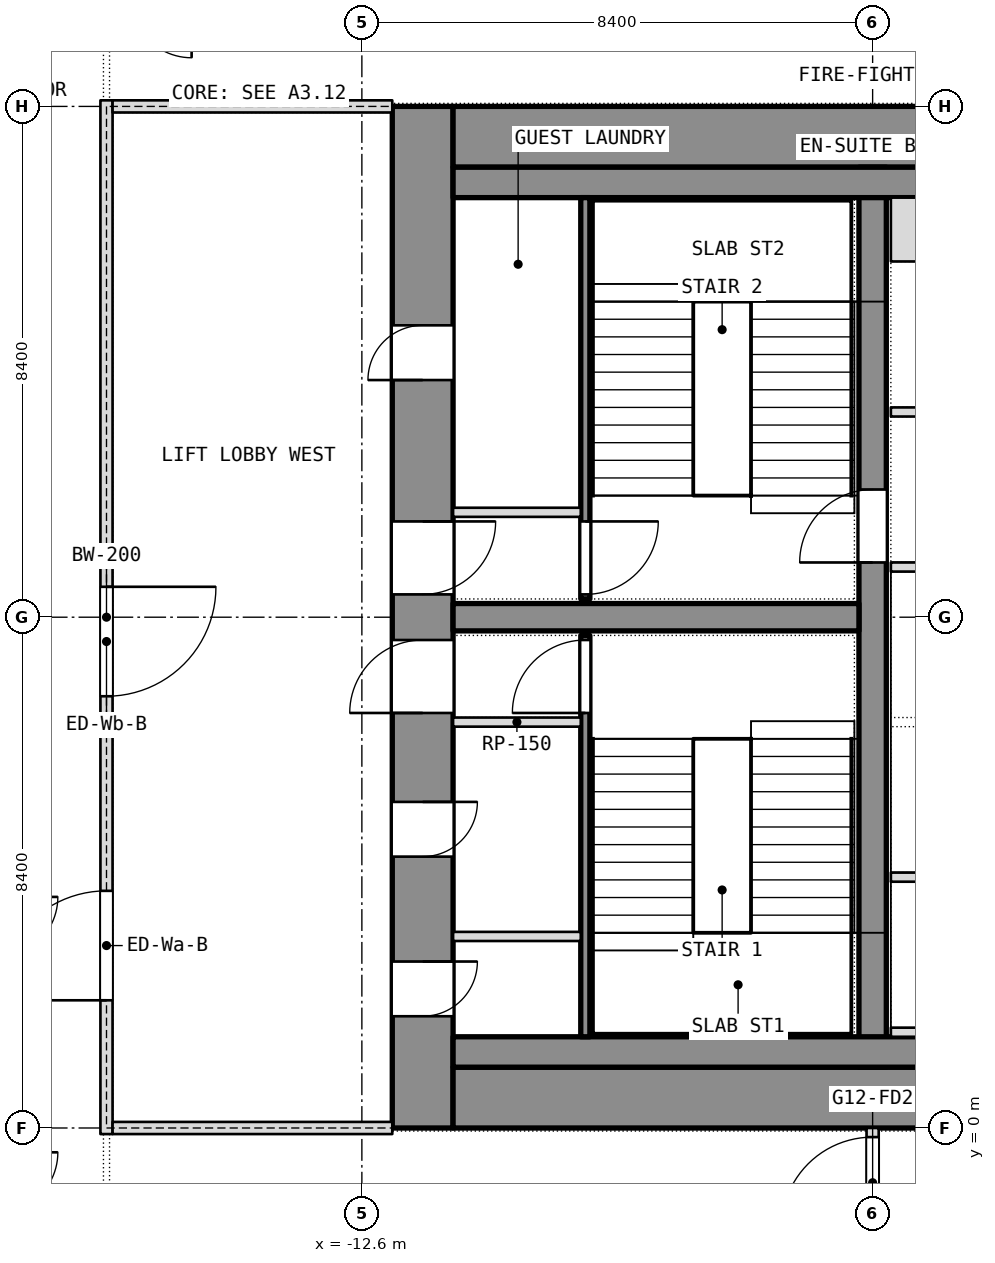
"""IFC4 building model, lengths in metres.
Left out: names, types, materials, properties, quantities, classifications, styles, units other than length and angle.
Written with IfcOpenShell. Run it as: python <this file> out.ifc"""

import sys

from ifc_helpers import new_model, si_unit, direction, frame, frame_2d, origin, place, context, subcontext, project, spatial, rectangle, extrude, element, fill, save


model = new_model("IFC4")
c1 = context("Model", 3, precision=1e-05, world=origin(), true_north=direction((0.0, 1.0)))
c2 = subcontext(c1, "Body", "Model", "MODEL_VIEW")
j1 = project(units=[si_unit("LENGTHUNIT", "METRE"), si_unit("PLANEANGLEUNIT", "RADIAN")], contexts=[c1])
p1 = place(None, origin())
s1 = spatial("IfcSite", under=j1, at=p1, CompositionType="ELEMENT")
p2 = place(p1, origin())
s2 = spatial("IfcBuilding", under=s1, at=p2, CompositionType="ELEMENT")
p3 = place(p2, frame((0.0, 0.0, 140.9)))
s3 = spatial("IfcBuildingStorey", under=s2, at=p3, CompositionType="ELEMENT", Elevation=140.9)
p4 = place(p3, frame((-11.6, 0.0, 0.0), z_axis=(0.0, 0.0, 1.0), x_axis=(0.0, 1.0, 0.0)))
e1 = element("IfcWall", 1, at=p4, inside=s3, PredefinedType="SHEAR", context=c2, shape_type="SweptSolid", body=[
    extrude(rectangle(XDim=16.8, YDim=1.0, at=frame_2d((8.4, 0.0))), origin(), (0.0, 0.0, 1.0), 3.6),
])
p5 = place(p4, frame((1.837, 0.0, 0.0)))
e2 = element("IfcOpeningElement", 2, at=p5, cuts=e1, PredefinedType="OPENING", context=c2, shape_type="SweptSolid", body=[
    extrude(rectangle(XDim=0.9, YDim=2.1, at=frame_2d((0.45, 1.05))), frame((0.0, 0.5, 0.0), z_axis=(0.0, -1.0, 0.0), x_axis=(1.0, 0.0, 0.0)), (0.0, 0.0, 1.0), 1.0),
])
p6 = place(p4, frame((4.462, 0.0, 0.0)))
e3 = element("IfcOpeningElement", 3, at=p6, cuts=e1, PredefinedType="OPENING", context=c2, shape_type="SweptSolid", body=[
    extrude(rectangle(XDim=0.9, YDim=2.1, at=frame_2d((0.45, 1.05))), frame((0.0, 0.5, 0.0), z_axis=(0.0, -1.0, 0.0), x_axis=(1.0, 0.0, 0.0)), (0.0, 0.0, 1.0), 1.0),
])
p7 = place(p4, frame((6.825, 0.0, 0.0)))
e4 = element("IfcOpeningElement", 4, at=p7, cuts=e1, PredefinedType="OPENING", context=c2, shape_type="SweptSolid", body=[
    extrude(rectangle(XDim=1.2, YDim=2.1, at=frame_2d((0.6, 1.05))), frame((0.0, 0.5, 0.0), z_axis=(0.0, -1.0, 0.0), x_axis=(1.0, 0.0, 0.0)), (0.0, 0.0, 1.0), 1.0),
])
p8 = place(p4, frame((12.3, 0.0, 0.0)))
e5 = element("IfcOpeningElement", 5, at=p8, cuts=e1, PredefinedType="OPENING", context=c2, shape_type="SweptSolid", body=[
    extrude(rectangle(XDim=0.9, YDim=2.1, at=frame_2d((0.45, 1.05))), frame((0.0, 0.5, 0.0), z_axis=(0.0, -1.0, 0.0), x_axis=(1.0, 0.0, 0.0)), (0.0, 0.0, 1.0), 1.0),
])
p9 = place(p4, frame((8.775, 0.0, 0.0)))
e6 = element("IfcOpeningElement", 6, at=p9, cuts=e1, PredefinedType="OPENING", context=c2, shape_type="SweptSolid", body=[
    extrude(rectangle(XDim=1.2, YDim=2.1, at=frame_2d((0.6, 1.05))), frame((0.0, 0.5, 0.0), z_axis=(0.0, -1.0, 0.0), x_axis=(1.0, 0.0, 0.0)), (0.0, 0.0, 1.0), 1.0),
])
for number, where, z_axis, x_axis in (
    (7, (-11.1, 0.5, 0.0), (0.0, 0.0, 1.0), (1.0, 0.0, 0.0)),
    (8, (-11.1, 16.3, 0.0), (0.0, 0.0, 1.0), (1.0, 0.0, 0.0)),
):
    element("IfcWall", number, at=place(p3, frame(where, z_axis=z_axis, x_axis=x_axis)), inside=s3, PredefinedType="SHEAR", context=c2, shape_type="SweptSolid", body=[
        extrude(rectangle(XDim=22.2, YDim=1.0, at=frame_2d((11.1, 0.0))), origin(), (0.0, 0.0, 1.0), 3.6),
    ])
p10 = place(p3, frame((-4.2, 1.0, 0.0), z_axis=(0.0, 0.0, 1.0), x_axis=(0.0, 1.0, 0.0)))
e9 = element("IfcWall", 9, at=p10, inside=s3, PredefinedType="SHEAR", context=c2, shape_type="SweptSolid", body=[
    extrude(rectangle(XDim=14.8, YDim=0.45, at=frame_2d((7.4, 0.0))), origin(), (0.0, 0.0, 1.0), 3.6),
])
p11 = place(p10, frame((8.3, 0.0, 0.0)))
e10 = element("IfcOpeningElement", 10, at=p11, cuts=e9, PredefinedType="OPENING", context=c2, shape_type="SweptSolid", body=[
    extrude(rectangle(XDim=1.2, YDim=2.1, at=frame_2d((0.6, 1.05))), frame((0.0, 0.225, 0.0), z_axis=(0.0, -1.0, 0.0), x_axis=(1.0, 0.0, 0.0)), (0.0, 0.0, 1.0), 0.45),
])
p12 = place(p3, frame((-11.1, 8.4, 0.0), z_axis=(0.0, 0.0, 1.0), x_axis=(1.0, 0.0, 0.0)))
e11 = element("IfcWall", 11, at=p12, inside=s3, PredefinedType="SHEAR", context=c2, shape_type="SweptSolid", body=[
    extrude(rectangle(XDim=6.675, YDim=0.45, at=frame_2d((3.337, 0.0))), origin(), (0.0, 0.0, 1.0), 3.6),
])
p13 = place(p3, frame((-4.2, -13.8, 0.0), z_axis=(0.0, 0.0, 1.0), x_axis=(0.0, 1.0, 0.0)))
e12 = element("IfcWall", 12, at=p13, inside=s3, PredefinedType="PARTITIONING", context=c2, shape_type="SweptSolid", body=[
    extrude(rectangle(XDim=13.8, YDim=0.2, at=frame_2d((6.9, 0.0))), origin(), (0.0, 0.0, 1.0), 3.34),
])
p14 = place(p13, frame((12.15, 0.0, 0.0)))
e13 = element("IfcOpeningElement", 13, at=p14, cuts=e12, PredefinedType="OPENING", context=c2, shape_type="SweptSolid", body=[
    extrude(rectangle(XDim=1.5, YDim=2.1, at=frame_2d((0.75, 1.05))), frame((0.0, 0.1, 0.0), z_axis=(0.0, -1.0, 0.0), x_axis=(1.0, 0.0, 0.0)), (0.0, 0.0, 1.0), 0.2),
])
p15 = place(p13, frame((0.325, 0.0, 0.0)))
e14 = element("IfcOpeningElement", 14, at=p15, cuts=e12, PredefinedType="OPENING", context=c2, shape_type="SweptSolid", body=[
    extrude(rectangle(XDim=1.5, YDim=2.1, at=frame_2d((0.75, 1.05))), frame((0.0, 0.1, 0.0), z_axis=(0.0, -1.0, 0.0), x_axis=(1.0, 0.0, 0.0)), (0.0, 0.0, 1.0), 0.2),
])
for number, where, z_axis, x_axis in (
    (15, (-11.1, 1.25, 0.0), (0.0, 0.0, 1.0), (1.0, 0.0, 0.0)),
    (16, (-11.1, 15.55, 0.0), (0.0, 0.0, 1.0), (1.0, 0.0, 0.0)),
):
    element("IfcWall", number, at=place(p3, frame(where, z_axis=z_axis, x_axis=x_axis)), inside=s3, PredefinedType="PARTITIONING", context=c2, shape_type="SweptSolid", body=[
        extrude(rectangle(XDim=22.2, YDim=0.5, at=frame_2d((11.1, 0.0))), origin(), (0.0, 0.0, 1.0), 3.34),
    ])
p16 = place(p3, frame((-8.925, 1.5, 0.0), z_axis=(0.0, 0.0, 1.0), x_axis=(0.0, 1.0, 0.0)))
e17 = element("IfcWall", 17, at=p16, inside=s3, PredefinedType="SHEAR", context=c2, shape_type="SweptSolid", body=[
    extrude(rectangle(XDim=6.6, YDim=0.15, at=frame_2d((3.3, 0.0))), origin(), (0.0, 0.0, 1.0), 3.34),
])
p17 = place(p16, frame((5.325, 0.0, 0.0)))
e18 = element("IfcOpeningElement", 18, at=p17, cuts=e17, PredefinedType="OPENING", context=c2, shape_type="SweptSolid", body=[
    extrude(rectangle(XDim=1.2, YDim=2.1, at=frame_2d((0.6, 1.05))), frame((0.0, 0.075, 0.0), z_axis=(0.0, -1.0, 0.0), x_axis=(1.0, 0.0, 0.0)), (0.0, 0.0, 1.0), 0.15),
])
for number, where, z_axis, x_axis in (
    (19, (-11.1, 6.675, 0.0), (0.0, 0.0, 1.0), (1.0, 0.0, 0.0)),
    (20, (-11.1, 3.15, 0.0), (0.0, 0.0, 1.0), (1.0, 0.0, 0.0)),
):
    element("IfcWall", number, at=place(p3, frame(where, z_axis=z_axis, x_axis=x_axis)), inside=s3, PredefinedType="PARTITIONING", context=c2, shape_type="SweptSolid", body=[
        extrude(rectangle(XDim=2.1, YDim=0.15, at=frame_2d((1.05, 0.0))), origin(), (0.0, 0.0, 1.0), 3.34),
    ])
p18 = place(p3, frame((-8.925, 8.7, 0.0), z_axis=(0.0, 0.0, 1.0), x_axis=(0.0, 1.0, 0.0)))
e21 = element("IfcWall", 21, at=p18, inside=s3, PredefinedType="SHEAR", context=c2, shape_type="SweptSolid", body=[
    extrude(rectangle(XDim=6.6, YDim=0.15, at=frame_2d((3.3, 0.0))), origin(), (0.0, 0.0, 1.0), 3.34),
])
p19 = place(p18, frame((0.075, 0.0, 0.0)))
e22 = element("IfcOpeningElement", 22, at=p19, cuts=e21, PredefinedType="OPENING", context=c2, shape_type="SweptSolid", body=[
    extrude(rectangle(XDim=1.2, YDim=2.1, at=frame_2d((0.6, 1.05))), frame((0.0, 0.075, 0.0), z_axis=(0.0, -1.0, 0.0), x_axis=(1.0, 0.0, 0.0)), (0.0, 0.0, 1.0), 0.15),
])
p20 = place(p3, frame((-11.1, 10.125, 0.0), z_axis=(0.0, 0.0, 1.0), x_axis=(1.0, 0.0, 0.0)))
e23 = element("IfcWall", 23, at=p20, inside=s3, PredefinedType="PARTITIONING", context=c2, shape_type="SweptSolid", body=[
    extrude(rectangle(XDim=2.1, YDim=0.15, at=frame_2d((1.05, 0.0))), origin(), (0.0, 0.0, 1.0), 3.34),
])
p21 = place(p3, frame((-3.9, 4.125, 0.0), z_axis=(0.0, 0.0, 1.0), x_axis=(1.0, 0.0, 0.0)))
e24 = element("IfcWall", 24, at=p21, inside=s3, PredefinedType="PARTITIONING", context=c2, shape_type="SweptSolid", body=[
    extrude(rectangle(XDim=7.8, YDim=0.15, at=frame_2d((3.9, 0.0))), origin(), (0.0, 0.0, 1.0), 3.34),
])
p22 = place(p21, frame((3.75, 0.0, 0.0)))
e25 = element("IfcOpeningElement", 25, at=p22, cuts=e24, PredefinedType="OPENING", context=c2, shape_type="SweptSolid", body=[
    extrude(rectangle(XDim=1.2, YDim=2.1, at=frame_2d((0.6, 1.05))), frame((0.0, 0.075, 0.0), z_axis=(0.0, -1.0, 0.0), x_axis=(1.0, 0.0, 0.0)), (0.0, 0.0, 1.0), 0.15),
])
p23 = place(p3, frame((-3.9, 11.775, 0.0), z_axis=(0.0, 0.0, 1.0), x_axis=(1.0, 0.0, 0.0)))
e26 = element("IfcWall", 26, at=p23, inside=s3, PredefinedType="PARTITIONING", context=c2, shape_type="SweptSolid", body=[
    extrude(rectangle(XDim=7.8, YDim=0.15, at=frame_2d((3.9, 0.0))), origin(), (0.0, 0.0, 1.0), 3.34),
])
p24 = place(p23, frame((3.3, 0.0, 0.0)))
e27 = element("IfcOpeningElement", 27, at=p24, cuts=e26, PredefinedType="OPENING", context=c2, shape_type="SweptSolid", body=[
    extrude(rectangle(XDim=1.2, YDim=2.1, at=frame_2d((0.6, 1.05))), frame((0.0, 0.075, 0.0), z_axis=(0.0, -1.0, 0.0), x_axis=(1.0, 0.0, 0.0)), (0.0, 0.0, 1.0), 0.15),
])
p25 = place(p3, frame((-3.9, 1.575, 0.0), z_axis=(0.0, 0.0, 1.0), x_axis=(1.0, 0.0, 0.0)))
e28 = element("IfcWall", 28, at=p25, inside=s3, PredefinedType="SHEAR", context=c2, shape_type="SweptSolid", body=[
    extrude(rectangle(XDim=3.0, YDim=0.15, at=frame_2d((1.5, 0.0))), origin(), (0.0, 0.0, 1.0), 3.6),
])
p26 = place(p3, frame((-3.9, 9.225, 0.0), z_axis=(0.0, 0.0, 1.0), x_axis=(1.0, 0.0, 0.0)))
e29 = element("IfcWall", 29, at=p26, inside=s3, PredefinedType="SHEAR", context=c2, shape_type="SweptSolid", body=[
    extrude(rectangle(XDim=2.25, YDim=0.15, at=frame_2d((1.125, 0.0))), origin(), (0.0, 0.0, 1.0), 3.6),
])
p27 = place(p3, frame((-3.9, 14.775, 0.0), z_axis=(0.0, 0.0, 1.0), x_axis=(1.0, 0.0, 0.0)))
e30 = element("IfcWall", 30, at=p27, inside=s3, PredefinedType="PARTITIONING", context=c2, shape_type="SweptSolid", body=[
    extrude(rectangle(XDim=2.25, YDim=1.05, at=frame_2d((1.125, 0.0))), origin(), (0.0, 0.0, 1.0), 3.34),
])
p28 = place(p3, frame((-16.8, -0.1, 0.0), z_axis=(0.0, 0.0, 1.0), x_axis=(0.0, 1.0, 0.0)))
e31 = element("IfcWall", 31, at=p28, inside=s3, PredefinedType="PARTITIONING", context=c2, shape_type="SweptSolid", body=[
    extrude(rectangle(XDim=17.0, YDim=0.2, at=frame_2d((8.5, 0.0))), origin(), (0.0, 0.0, 1.0), 3.34),
])
p29 = place(p28, frame((2.2, 0.0, 0.0)))
e32 = element("IfcOpeningElement", 32, at=p29, cuts=e31, PredefinedType="OPENING", context=c2, shape_type="SweptSolid", body=[
    extrude(rectangle(XDim=1.8, YDim=2.1, at=frame_2d((0.9, 1.05))), frame((0.0, 0.1, 0.0), z_axis=(0.0, -1.0, 0.0), x_axis=(1.0, 0.0, 0.0)), (0.0, 0.0, 1.0), 0.2),
])
p30 = place(p28, frame((7.2, 0.0, 0.0)))
e33 = element("IfcOpeningElement", 33, at=p30, cuts=e31, PredefinedType="OPENING", context=c2, shape_type="SweptSolid", body=[
    extrude(rectangle(XDim=1.8, YDim=2.1, at=frame_2d((0.9, 1.05))), frame((0.0, 0.1, 0.0), z_axis=(0.0, -1.0, 0.0), x_axis=(1.0, 0.0, 0.0)), (0.0, 0.0, 1.0), 0.2),
])
for number, where, z_axis, x_axis in (
    (34, (-16.7, 0.0, 0.0), (0.0, 0.0, 1.0), (1.0, 0.0, 0.0)),
    (35, (-16.7, 16.8, 0.0), (0.0, 0.0, 1.0), (1.0, 0.0, 0.0)),
):
    element("IfcWall", number, at=place(p3, frame(where, z_axis=z_axis, x_axis=x_axis)), inside=s3, PredefinedType="PARTITIONING", context=c2, shape_type="SweptSolid", body=[
        extrude(rectangle(XDim=4.6, YDim=0.2, at=frame_2d((2.3, 0.0))), origin(), (0.0, 0.0, 1.0), 2.89),
    ])
p31 = place(p5, origin())
e36 = element("IfcDoor", 36, at=p31, inside=s3, OperationType="SINGLE_SWING_LEFT", PredefinedType="DOOR", context=c2, shape_type="SweptSolid", body=[
    extrude(rectangle(XDim=0.9, YDim=2.1, at=frame_2d((0.45, 1.05))), frame((0.0, 0.025, 0.0), z_axis=(0.0, -1.0, 0.0), x_axis=(1.0, 0.0, 0.0)), (0.0, 0.0, 1.0), 0.05),
])
fill(e2, e36)
p32 = place(p6, origin())
e37 = element("IfcDoor", 37, at=p32, inside=s3, OperationType="SINGLE_SWING_LEFT", PredefinedType="DOOR", context=c2, shape_type="SweptSolid", body=[
    extrude(rectangle(XDim=0.9, YDim=2.1, at=frame_2d((0.45, 1.05))), frame((0.0, 0.025, 0.0), z_axis=(0.0, -1.0, 0.0), x_axis=(1.0, 0.0, 0.0)), (0.0, 0.0, 1.0), 0.05),
])
fill(e3, e37)
p33 = place(p7, origin())
e38 = element("IfcDoor", 38, at=p33, inside=s3, OperationType="SINGLE_SWING_LEFT", PredefinedType="DOOR", context=c2, shape_type="SweptSolid", body=[
    extrude(rectangle(XDim=1.2, YDim=2.1, at=frame_2d((0.6, 1.05))), frame((0.0, 0.025, 0.0), z_axis=(0.0, -1.0, 0.0), x_axis=(1.0, 0.0, 0.0)), (0.0, 0.0, 1.0), 0.05),
])
fill(e4, e38)
p34 = place(p17, origin())
e39 = element("IfcDoor", 39, at=p34, inside=s3, OperationType="SINGLE_SWING_LEFT", PredefinedType="DOOR", context=c2, shape_type="SweptSolid", body=[
    extrude(rectangle(XDim=1.2, YDim=2.1, at=frame_2d((0.6, 1.05))), frame((0.0, 0.025, 0.0), z_axis=(0.0, -1.0, 0.0), x_axis=(1.0, 0.0, 0.0)), (0.0, 0.0, 1.0), 0.05),
])
fill(e18, e39)
p35 = place(p8, origin())
e40 = element("IfcDoor", 40, at=p35, inside=s3, OperationType="SINGLE_SWING_LEFT", PredefinedType="DOOR", context=c2, shape_type="SweptSolid", body=[
    extrude(rectangle(XDim=0.9, YDim=2.1, at=frame_2d((0.45, 1.05))), frame((0.0, 0.025, 0.0), z_axis=(0.0, -1.0, 0.0), x_axis=(1.0, 0.0, 0.0)), (0.0, 0.0, 1.0), 0.05),
])
fill(e5, e40)
p36 = place(p9, origin())
e41 = element("IfcDoor", 41, at=p36, inside=s3, OperationType="SINGLE_SWING_LEFT", PredefinedType="DOOR", context=c2, shape_type="SweptSolid", body=[
    extrude(rectangle(XDim=1.2, YDim=2.1, at=frame_2d((0.6, 1.05))), frame((0.0, 0.025, 0.0), z_axis=(0.0, -1.0, 0.0), x_axis=(1.0, 0.0, 0.0)), (0.0, 0.0, 1.0), 0.05),
])
fill(e6, e41)
p37 = place(p19, origin())
e42 = element("IfcDoor", 42, at=p37, inside=s3, OperationType="SINGLE_SWING_LEFT", PredefinedType="DOOR", context=c2, shape_type="SweptSolid", body=[
    extrude(rectangle(XDim=1.2, YDim=2.1, at=frame_2d((0.6, 1.05))), frame((0.0, 0.025, 0.0), z_axis=(0.0, -1.0, 0.0), x_axis=(1.0, 0.0, 0.0)), (0.0, 0.0, 1.0), 0.05),
])
fill(e22, e42)
p38 = place(p11, origin())
e43 = element("IfcDoor", 43, at=p38, inside=s3, OperationType="SINGLE_SWING_LEFT", PredefinedType="DOOR", context=c2, shape_type="SweptSolid", body=[
    extrude(rectangle(XDim=1.2, YDim=2.1, at=frame_2d((0.6, 1.05))), frame((0.0, 0.025, 0.0), z_axis=(0.0, -1.0, 0.0), x_axis=(1.0, 0.0, 0.0)), (0.0, 0.0, 1.0), 0.05),
])
fill(e10, e43)
p39 = place(p29, origin())
e44 = element("IfcDoor", 44, at=p39, inside=s3, OperationType="DOUBLE_DOOR_SINGLE_SWING", PredefinedType="DOOR", context=c2, shape_type="SweptSolid", body=[
    extrude(rectangle(XDim=1.8, YDim=2.1, at=frame_2d((0.9, 1.05))), frame((0.0, 0.025, 0.0), z_axis=(0.0, -1.0, 0.0), x_axis=(1.0, 0.0, 0.0)), (0.0, 0.0, 1.0), 0.05),
])
fill(e32, e44)
p40 = place(p30, origin())
e45 = element("IfcDoor", 45, at=p40, inside=s3, OperationType="DOUBLE_DOOR_SINGLE_SWING", PredefinedType="DOOR", context=c2, shape_type="SweptSolid", body=[
    extrude(rectangle(XDim=1.8, YDim=2.1, at=frame_2d((0.9, 1.05))), frame((0.0, 0.025, 0.0), z_axis=(0.0, -1.0, 0.0), x_axis=(1.0, 0.0, 0.0)), (0.0, 0.0, 1.0), 0.05),
])
fill(e33, e45)
p41 = place(p14, origin())
e46 = element("IfcDoor", 46, at=p41, inside=s3, OperationType="DOUBLE_DOOR_DOUBLE_SWING", PredefinedType="DOOR", context=c2, shape_type="SweptSolid", body=[
    extrude(rectangle(XDim=1.5, YDim=2.1, at=frame_2d((0.75, 1.05))), frame((0.0, 0.025, 0.0), z_axis=(0.0, -1.0, 0.0), x_axis=(1.0, 0.0, 0.0)), (0.0, 0.0, 1.0), 0.05),
])
fill(e13, e46)
save(model, sys.argv[1])
